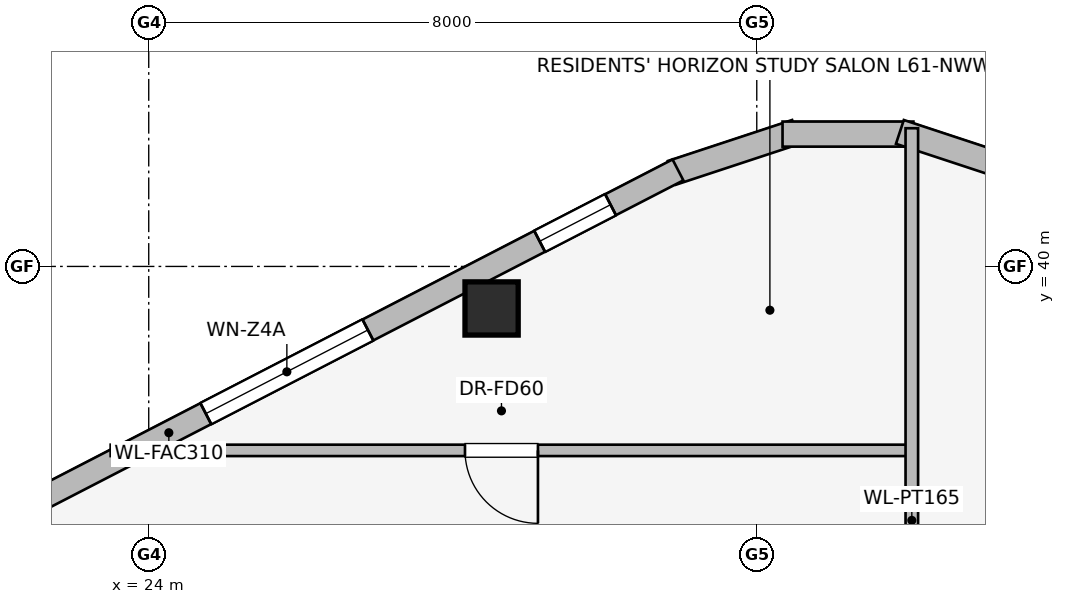
"""IFC4 building model, lengths in metres.
Left out: names, types, materials, properties, quantities, classifications, styles, units other than length and angle.
Written with IfcOpenShell. Run it as: python <this file> out.ifc"""

import sys

from ifc_helpers import new_model, si_unit, direction, frame, frame_2d, origin, origin_2d, place, context, subcontext, project, spatial, rectangle, extrude, element, fill, save


model = new_model("IFC4")
c1 = context("Model", 3, precision=1e-05, world=origin(), true_north=direction((0.0, 1.0)))
c2 = subcontext(c1, "Body", "Model", "MODEL_VIEW")
j1 = project(units=[si_unit("LENGTHUNIT", "METRE"), si_unit("PLANEANGLEUNIT", "RADIAN")], contexts=[c1])
p1 = place(None, origin())
s1 = spatial("IfcSite", under=j1, at=p1, CompositionType="ELEMENT")
p2 = place(p1, origin())
s2 = spatial("IfcBuilding", under=s1, at=p2, CompositionType="ELEMENT")
p3 = place(p2, frame((0.0, 0.0, 224.15)))
s3 = spatial("IfcBuildingStorey", under=s2, at=p3, CompositionType="ELEMENT", Elevation=224.15)
p4 = place(p3, frame((28.511, 39.447, 0.0), z_axis=(0.0, 0.0, 1.0), x_axis=(1.0, 0.0, 0.0)))
e1 = element("IfcColumn", 1, at=p4, inside=s3, PredefinedType="COLUMN", context=c2, shape_type="SweptSolid", body=[
    extrude(rectangle(XDim=0.7, YDim=0.7, at=origin_2d()), origin(), (0.0, 0.0, 1.0), 3.55),
])
p5 = place(p3, frame((30.882, 41.231, 0.0), z_axis=(0.0, 0.0, 1.0), x_axis=(0.949713440491, 0.313120393699, 0.0)))
e2 = element("IfcWall", 2, at=p5, inside=s3, PredefinedType="STANDARD", context=c2, shape_type="SweptSolid", body=[
    extrude(rectangle(XDim=1.722, YDim=0.33, at=frame_2d((0.861, 0.0))), origin(), (0.0, 0.0, 1.0), 3.29),
])
p6 = place(p3, frame((32.339, 41.741, 0.0), z_axis=(0.0, 0.0, 1.0), x_axis=(1.0, 0.0, 0.0)))
e3 = element("IfcWall", 3, at=p6, inside=s3, PredefinedType="STANDARD", context=c2, shape_type="SweptSolid", body=[
    extrude(rectangle(XDim=1.722, YDim=0.33, at=frame_2d((0.861, 0.0))), origin(), (0.0, 0.0, 1.0), 3.29),
])
p7 = place(p3, frame((33.883, 41.77, 0.0), z_axis=(0.0, 0.0, 1.0), x_axis=(0.949713440491, -0.313120393699, 0.0)))
e4 = element("IfcWall", 4, at=p7, inside=s3, PredefinedType="STANDARD", context=c2, shape_type="SweptSolid", body=[
    extrude(rectangle(XDim=1.722, YDim=0.33, at=frame_2d((0.861, 0.0))), origin(), (0.0, 0.0, 1.0), 3.29),
])
p8 = place(p3, frame((17.566, 34.354, 0.0), z_axis=(0.0, 0.0, 1.0), x_axis=(0.888581481622, 0.458718814218, 0.0)))
e5 = element("IfcWall", 5, at=p8, inside=s3, PredefinedType="STANDARD", context=c2, shape_type="SweptSolid", body=[
    extrude(rectangle(XDim=15.077, YDim=0.31, at=frame_2d((7.539, 0.0))), origin(), (0.0, 0.0, 1.0), 3.29),
])
p9 = place(p8, frame((0.998, 0.0, 0.75)))
e6 = element("IfcOpeningElement", 6, at=p9, cuts=e5, PredefinedType="OPENING", context=c2, shape_type="SweptSolid", body=[
    extrude(rectangle(XDim=1.05, YDim=1.4, at=frame_2d((0.525, 0.7))), frame((0.0, 0.165, 0.0), z_axis=(0.0, -1.0, 0.0), x_axis=(1.0, 0.0, 0.0)), (0.0, 0.0, 1.0), 0.33),
])
p10 = place(p8, frame((4.403, 0.0, 0.75)))
e7 = element("IfcOpeningElement", 7, at=p10, cuts=e5, PredefinedType="OPENING", context=c2, shape_type="SweptSolid", body=[
    extrude(rectangle(XDim=1.05, YDim=1.4, at=frame_2d((0.525, 0.7))), frame((0.0, 0.165, 0.0), z_axis=(0.0, -1.0, 0.0), x_axis=(1.0, 0.0, 0.0)), (0.0, 0.0, 1.0), 0.33),
])
p11 = place(p8, frame((8.086, 0.0, 0.75)))
e8 = element("IfcOpeningElement", 8, at=p11, cuts=e5, PredefinedType="OPENING", context=c2, shape_type="SweptSolid", body=[
    extrude(rectangle(XDim=2.4, YDim=1.6, at=frame_2d((1.2, 0.8))), frame((0.0, 0.165, 0.0), z_axis=(0.0, -1.0, 0.0), x_axis=(1.0, 0.0, 0.0)), (0.0, 0.0, 1.0), 0.33),
])
p12 = place(p8, frame((13.029, 0.0, 0.75)))
e9 = element("IfcOpeningElement", 9, at=p12, cuts=e5, PredefinedType="OPENING", context=c2, shape_type="SweptSolid", body=[
    extrude(rectangle(XDim=1.05, YDim=1.4, at=frame_2d((0.525, 0.7))), frame((0.0, 0.165, 0.0), z_axis=(0.0, -1.0, 0.0), x_axis=(1.0, 0.0, 0.0)), (0.0, 0.0, 1.0), 0.33),
])
p13 = place(p3, frame((34.0, 37.58, 0.0), z_axis=(0.0, 0.0, 1.0), x_axis=(-1.0, 0.0, 0.0)))
e10 = element("IfcWall", 10, at=p13, inside=s3, PredefinedType="PARTITIONING", context=c2, shape_type="SweptSolid", body=[
    extrude(rectangle(XDim=10.501, YDim=0.15, at=frame_2d((5.25, 0.0))), origin(), (0.0, 0.0, 1.0), 2.682),
])
p14 = place(p13, frame((4.879, 0.0, 0.0)))
e11 = element("IfcOpeningElement", 11, at=p14, cuts=e10, PredefinedType="OPENING", context=c2, shape_type="SweptSolid", body=[
    extrude(rectangle(XDim=0.96, YDim=2.0, at=frame_2d((0.48, 1.0))), frame((0.0, 0.085, 0.0), z_axis=(0.0, -1.0, 0.0), x_axis=(1.0, 0.0, 0.0)), (0.0, 0.0, 1.0), 0.17),
])
p15 = place(p3, frame((34.04, 31.5, 0.0), z_axis=(0.0, 0.0, 1.0), x_axis=(0.0, 1.0, 0.0)))
e12 = element("IfcWall", 12, at=p15, inside=s3, PredefinedType="PARTITIONING", context=c2, shape_type="SweptSolid", body=[
    extrude(rectangle(XDim=10.318, YDim=0.165, at=frame_2d((5.159, 0.0))), origin(), (0.0, 0.0, 1.0), 3.29),
])
p16 = place(p11, origin())
e13 = element("IfcWindow", 13, at=p16, inside=s3, PartitioningType="SINGLE_PANEL", PredefinedType="WINDOW", context=c2, shape_type="SweptSolid", body=[
    extrude(rectangle(XDim=2.4, YDim=1.6, at=frame_2d((1.2, 0.8))), frame((0.0, 0.03, 0.0), z_axis=(0.0, -1.0, 0.0), x_axis=(1.0, 0.0, 0.0)), (0.0, 0.0, 1.0), 0.06),
])
fill(e8, e13)
p17 = place(p12, origin())
e14 = element("IfcWindow", 14, at=p17, inside=s3, PartitioningType="SINGLE_PANEL", PredefinedType="WINDOW", context=c2, shape_type="SweptSolid", body=[
    extrude(rectangle(XDim=1.05, YDim=1.4, at=frame_2d((0.525, 0.7))), frame((0.0, 0.03, 0.0), z_axis=(0.0, -1.0, 0.0), x_axis=(1.0, 0.0, 0.0)), (0.0, 0.0, 1.0), 0.06),
])
fill(e9, e14)
p18 = place(p14, origin())
e15 = element("IfcDoor", 15, at=p18, inside=s3, OperationType="SINGLE_SWING_LEFT", PredefinedType="DOOR", context=c2, shape_type="SweptSolid", body=[
    extrude(rectangle(XDim=0.96, YDim=2.0, at=frame_2d((0.48, 1.0))), frame((0.0, 0.025, 0.0), z_axis=(0.0, -1.0, 0.0), x_axis=(1.0, 0.0, 0.0)), (0.0, 0.0, 1.0), 0.05),
])
fill(e11, e15)
save(model, sys.argv[1])
